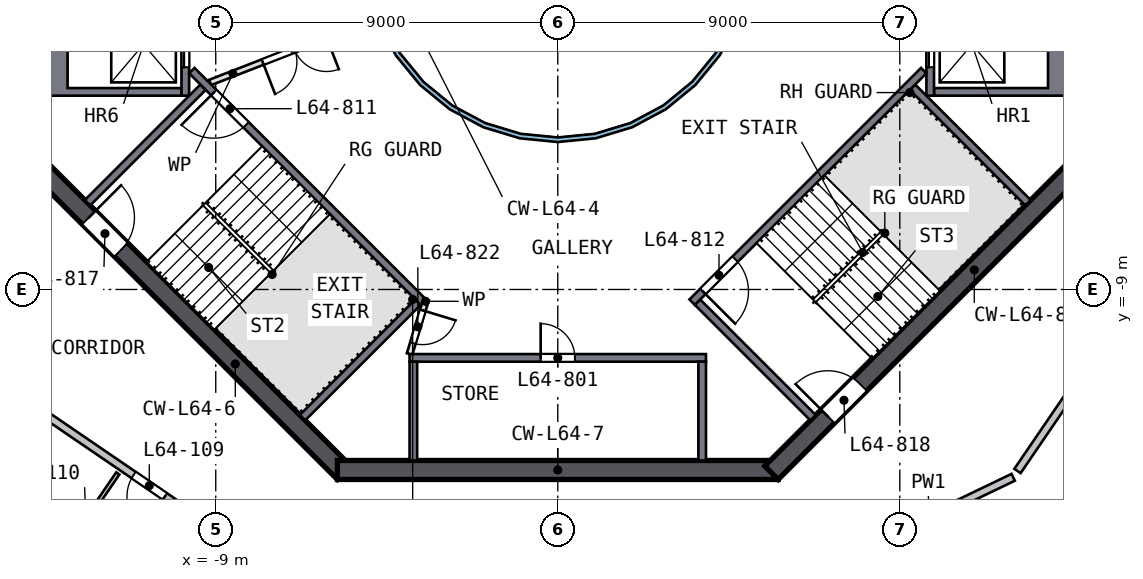
"""IFC4 building model, lengths in metres.
Left out: names, types, materials, properties, quantities, classifications, styles, units other than length and angle.
Written with IfcOpenShell. Run it as: python <this file> out.ifc"""

import sys

from ifc_helpers import new_model, si_unit, direction, frame, frame_2d, origin, place, context, subcontext, project, spatial, polyline, rectangle, outline, extrude, element, fill, save


model = new_model("IFC4")
c1 = context("Model", 3, precision=1e-05, world=origin(), true_north=direction((0.0, 1.0)))
c2 = subcontext(c1, "Body", "Model", "MODEL_VIEW")
j1 = project(units=[si_unit("LENGTHUNIT", "METRE"), si_unit("PLANEANGLEUNIT", "RADIAN")], contexts=[c1])
p1 = place(None, origin())
s1 = spatial("IfcSite", under=j1, at=p1, CompositionType="ELEMENT")
p2 = place(p1, origin())
s2 = spatial("IfcBuilding", under=s1, at=p2, CompositionType="ELEMENT")
p3 = place(p2, frame((0.0, 0.0, 259.5)))
s3 = spatial("IfcBuildingStorey", under=s2, at=p3, CompositionType="ELEMENT", Elevation=259.5)
p4 = place(p3, frame((-13.823, -5.622, 0.0), z_axis=(0.0, 0.0, 1.0), x_axis=(0.707106781, -0.707106781, 0.0)))
e1 = element("IfcWall", 1, at=p4, inside=s3, PredefinedType="SHEAR", context=c2, shape_type="SweptSolid", body=[
    extrude(rectangle(XDim=11.598, YDim=0.5, at=frame_2d((5.799, 0.0))), origin(), (0.0, 0.0, 1.0), 3.5),
])
p5 = place(p4, frame((2.099, 0.0, 0.0)))
e2 = element("IfcOpeningElement", 2, at=p5, cuts=e1, PredefinedType="OPENING", context=c2, shape_type="SweptSolid", body=[
    extrude(rectangle(XDim=1.2, YDim=2.1, at=frame_2d((0.6, 1.05))), frame((0.0, 0.26, 0.0), z_axis=(0.0, -1.0, 0.0), x_axis=(1.0, 0.0, 0.0)), (0.0, 0.0, 1.0), 0.52),
])
p6 = place(p3, frame((-5.799, -13.75, 0.0), z_axis=(0.0, 0.0, 1.0), x_axis=(1.0, 0.0, 0.0)))
e3 = element("IfcWall", 3, at=p6, inside=s3, PredefinedType="SHEAR", context=c2, shape_type="SweptSolid", body=[
    extrude(rectangle(XDim=11.598, YDim=0.5, at=frame_2d((5.799, 0.0))), origin(), (0.0, 0.0, 1.0), 3.5),
])
p7 = place(p3, frame((5.622, -13.823, 0.0), z_axis=(0.0, 0.0, 1.0), x_axis=(0.707106781, 0.707106781, 0.0)))
e4 = element("IfcWall", 4, at=p7, inside=s3, PredefinedType="SHEAR", context=c2, shape_type="SweptSolid", body=[
    extrude(rectangle(XDim=11.598, YDim=0.5, at=frame_2d((5.799, 0.0))), origin(), (0.0, 0.0, 1.0), 3.5),
])
p8 = place(p7, frame((2.099, 0.0, 0.0)))
e5 = element("IfcOpeningElement", 5, at=p8, cuts=e4, PredefinedType="OPENING", context=c2, shape_type="SweptSolid", body=[
    extrude(rectangle(XDim=1.2, YDim=2.1, at=frame_2d((0.6, 1.05))), frame((0.0, 0.26, 0.0), z_axis=(0.0, -1.0, 0.0), x_axis=(1.0, 0.0, 0.0)), (0.0, 0.0, 1.0), 0.52),
])
p9 = place(p3, origin())
e6 = element("IfcWall", 6, at=p9, inside=s3, PredefinedType="SOLIDWALL", context=c2, shape_type="SweptSolid", body=[
    extrude(outline(polyline([(13.5, -3.9), (9.9, -3.9), (9.9, -3.7), (12.9, -3.7), (12.9, -1.4), (9.9, -1.4), (9.9, -1.2), (13.5, -1.2), (13.5, -3.9)])), origin(), (0.0, 0.0, 1.0), 3.0),
])
p10 = place(p3, frame((9.8, -1.2, 0.0), z_axis=(0.0, 0.0, 1.0), x_axis=(0.0, -1.0, 0.0)))
e7 = element("IfcWall", 7, at=p10, inside=s3, PredefinedType="SOLIDWALL", context=c2, shape_type="SweptSolid", body=[
    extrude(rectangle(XDim=2.7, YDim=0.2, at=frame_2d((1.35, 0.0))), origin(), (0.0, 0.0, 1.0), 3.0),
])
p11 = place(p10, frame((0.75, 0.0, 0.0)))
e8 = element("IfcOpeningElement", 8, at=p11, cuts=e7, PredefinedType="OPENING", context=c2, shape_type="SweptSolid", body=[
    extrude(rectangle(XDim=1.2, YDim=2.1, at=frame_2d((0.6, 1.05))), frame((0.0, 0.11, 0.0), z_axis=(0.0, -1.0, 0.0), x_axis=(1.0, 0.0, 0.0)), (0.0, 0.0, 1.0), 0.22),
])
p12 = place(p3, origin())
e9 = element("IfcWall", 9, at=p12, inside=s3, PredefinedType="SOLIDWALL", context=c2, shape_type="SweptSolid", body=[
    extrude(outline(polyline([(-13.5, -3.9), (-13.5, -1.2), (-9.9, -1.2), (-9.9, -1.4), (-12.9, -1.4), (-12.9, -3.7), (-9.9, -3.7), (-9.9, -3.9), (-13.5, -3.9)])), origin(), (0.0, 0.0, 1.0), 3.0),
])
p13 = place(p3, frame((-9.8, -1.2, 0.0), z_axis=(0.0, 0.0, 1.0), x_axis=(0.0, -1.0, 0.0)))
e10 = element("IfcWall", 10, at=p13, inside=s3, PredefinedType="SOLIDWALL", context=c2, shape_type="SweptSolid", body=[
    extrude(rectangle(XDim=2.7, YDim=0.2, at=frame_2d((1.35, 0.0))), origin(), (0.0, 0.0, 1.0), 3.0),
])
p14 = place(p13, frame((0.75, 0.0, 0.0)))
e11 = element("IfcOpeningElement", 11, at=p14, cuts=e10, PredefinedType="OPENING", context=c2, shape_type="SweptSolid", body=[
    extrude(rectangle(XDim=1.2, YDim=2.1, at=frame_2d((0.6, 1.05))), frame((0.0, 0.11, 0.0), z_axis=(0.0, -1.0, 0.0), x_axis=(1.0, 0.0, 0.0)), (0.0, 0.0, 1.0), 0.22),
])
p15 = place(p3, frame((-3.9, -10.8, 0.0), z_axis=(0.0, 0.0, 1.0), x_axis=(1.0, 0.0, 0.0)))
e12 = element("IfcWall", 12, at=p15, inside=s3, PredefinedType="SOLIDWALL", context=c2, shape_type="SweptSolid", body=[
    extrude(rectangle(XDim=7.8, YDim=0.2, at=frame_2d((3.9, 0.0))), origin(), (0.0, 0.0, 1.0), 3.0),
])
p16 = place(p15, frame((3.45, 0.0, 0.0)))
e13 = element("IfcOpeningElement", 13, at=p16, cuts=e12, PredefinedType="OPENING", context=c2, shape_type="SweptSolid", body=[
    extrude(rectangle(XDim=0.9, YDim=2.1, at=frame_2d((0.45, 1.05))), frame((0.0, 0.11, 0.0), z_axis=(0.0, -1.0, 0.0), x_axis=(1.0, 0.0, 0.0)), (0.0, 0.0, 1.0), 0.22),
])
for number, where, z_axis, x_axis in (
    (14, (-3.8, -10.9, 0.0), (0.0, 0.0, 1.0), (0.0, -1.0, 0.0)),
    (15, (3.8, -10.9, 0.0), (0.0, 0.0, 1.0), (0.0, -1.0, 0.0)),
):
    element("IfcWall", number, at=place(p3, frame(where, z_axis=z_axis, x_axis=x_axis)), inside=s3, PredefinedType="SOLIDWALL", context=c2, shape_type="SweptSolid", body=[
        extrude(rectangle(XDim=2.6, YDim=0.2, at=frame_2d((1.3, 0.0))), origin(), (0.0, 0.0, 1.0), 3.0),
    ])
p17 = place(p3, frame((-3.535, -9.334, 0.0), z_axis=(0.0, 0.0, 1.0), x_axis=(-0.707120946, 0.707092617, 0.0)))
e16 = element("IfcWall", 16, at=p17, inside=s3, PredefinedType="SOLIDWALL", context=c2, shape_type="SweptSolid", body=[
    extrude(rectangle(XDim=8.618, YDim=0.2, at=frame_2d((4.309, 0.0))), origin(), (0.0, 0.0, 1.0), 3.0),
])
p18 = place(p17, frame((6.6, 0.0, 0.0)))
e17 = element("IfcOpeningElement", 17, at=p18, cuts=e16, PredefinedType="OPENING", context=c2, shape_type="SweptSolid", body=[
    extrude(rectangle(XDim=1.2, YDim=2.1, at=frame_2d((0.6, 1.05))), frame((0.0, 0.11, 0.0), z_axis=(0.0, -1.0, 0.0), x_axis=(1.0, 0.0, 0.0)), (0.0, 0.0, 1.0), 0.22),
])
for number, where, z_axis, x_axis in (
    (18, (-9.334, -3.677, 0.0), (0.0, 0.0, 1.0), (-0.707, -0.707, 0.0)),
    (19, (-3.677, -9.334, 0.0), (0.0, 0.0, 1.0), (-0.707, -0.707, 0.0)),
):
    element("IfcWall", number, at=place(p3, frame(where, z_axis=z_axis, x_axis=x_axis)), inside=s3, PredefinedType="SOLIDWALL", context=c2, shape_type="SweptSolid", body=[
        extrude(rectangle(XDim=4.3, YDim=0.2, at=frame_2d((2.15, 0.0))), origin(), (0.0, 0.0, 1.0), 3.0),
    ])
p19 = place(p3, frame((9.629, -3.24, 0.0), z_axis=(0.0, 0.0, 1.0), x_axis=(-0.707120946, -0.707092617, 0.0)))
e20 = element("IfcWall", 20, at=p19, inside=s3, PredefinedType="SOLIDWALL", context=c2, shape_type="SweptSolid", body=[
    extrude(rectangle(XDim=8.618, YDim=0.2, at=frame_2d((4.309, 0.0))), origin(), (0.0, 0.0, 1.0), 3.0),
])
p20 = place(p19, frame((7.018, 0.0, 0.0)))
e21 = element("IfcOpeningElement", 21, at=p20, cuts=e20, PredefinedType="OPENING", context=c2, shape_type="SweptSolid", body=[
    extrude(rectangle(XDim=1.2, YDim=2.1, at=frame_2d((0.6, 1.05))), frame((0.0, 0.11, 0.0), z_axis=(0.0, -1.0, 0.0), x_axis=(1.0, 0.0, 0.0)), (0.0, 0.0, 1.0), 0.22),
])
for number, where, z_axis, x_axis in (
    (22, (3.677, -9.334, 0.0), (0.0, 0.0, 1.0), (0.707, -0.707, 0.0)),
    (23, (9.334, -3.677, 0.0), (0.0, 0.0, 1.0), (0.707, -0.707, 0.0)),
):
    element("IfcWall", number, at=place(p3, frame(where, z_axis=z_axis, x_axis=x_axis)), inside=s3, PredefinedType="SOLIDWALL", context=c2, shape_type="SweptSolid", body=[
        extrude(rectangle(XDim=4.3, YDim=0.2, at=frame_2d((2.15, 0.0))), origin(), (0.0, 0.0, 1.0), 3.0),
    ])
p21 = place(p3, frame((-3.465, -9.263, 0.0), z_axis=(0.0, 0.0, 1.0), x_axis=(-0.289808785, -0.957084567, 0.0)))
e24 = element("IfcWall", 24, at=p21, inside=s3, PredefinedType="PARTITIONING", context=c2, shape_type="SweptSolid", body=[
    extrude(rectangle(XDim=1.501, YDim=0.15, at=frame_2d((0.75, 0.0))), origin(), (0.0, 0.0, 1.0), 3.0),
])
p22 = place(p21, frame((0.301, 0.0, 0.0)))
e25 = element("IfcOpeningElement", 25, at=p22, cuts=e24, PredefinedType="OPENING", context=c2, shape_type="SweptSolid", body=[
    extrude(rectangle(XDim=0.9, YDim=2.1, at=frame_2d((0.45, 1.05))), frame((0.0, 0.085, 0.0), z_axis=(0.0, -1.0, 0.0), x_axis=(1.0, 0.0, 0.0)), (0.0, 0.0, 1.0), 0.17),
])
p23 = place(p3, frame((-4.782, -1.857, 0.0), z_axis=(0.0, 0.0, 1.0), x_axis=(-0.932155279, -0.362058746, 0.0)))
e26 = element("IfcWall", 26, at=p23, inside=s3, PredefinedType="PARTITIONING", context=c2, shape_type="SweptSolid", body=[
    extrude(rectangle(XDim=4.682, YDim=0.15, at=frame_2d((2.341, 0.0))), origin(), (0.0, 0.0, 1.0), 3.0),
])
p24 = place(p23, frame((1.4, 0.0, 0.0)))
e27 = element("IfcOpeningElement", 27, at=p24, cuts=e26, PredefinedType="OPENING", context=c2, shape_type="SweptSolid", body=[
    extrude(rectangle(XDim=1.8, YDim=2.1, at=frame_2d((0.9, 1.05))), frame((0.0, 0.085, 0.0), z_axis=(0.0, -1.0, 0.0), x_axis=(1.0, 0.0, 0.0)), (0.0, 0.0, 1.0), 0.17),
])
p25 = place(p3, origin())
e28 = element("IfcWall", 28, at=p25, inside=s3, PredefinedType="SOLIDWALL", context=c2, shape_type="SweptSolid", body=[
    extrude(outline(polyline([(5.021, -0.999), (4.73, -1.959), (4.257, -2.844), (3.62, -3.62), (2.844, -4.257), (1.959, -4.73), (0.999, -5.021), (0.0, -5.12), (-0.999, -5.021), (-1.959, -4.73), (-2.844, -4.257), (-3.62, -3.62), (-4.257, -2.844), (-4.73, -1.959), (-5.021, -0.999), (-5.12, 0.0), (-5.021, 0.999), (-4.73, 1.959), (-4.257, 2.844), (-3.62, 3.62), (-2.844, 4.257), (-1.959, 4.73), (-0.999, 5.021), (0.0, 5.12), (0.999, 5.021), (1.959, 4.73), (2.844, 4.257), (3.62, 3.62), (4.257, 2.844), (4.73, 1.959), (5.021, 0.999), (5.12, 0.0), (5.021, -0.999)]), holes=[polyline([(4.904, 0.976), (4.619, 1.913), (4.157, 2.778), (3.535, 3.535), (2.778, 4.157), (1.913, 4.619), (0.976, 4.904), (0.0, 5.0), (-0.976, 4.904), (-1.913, 4.619), (-2.778, 4.157), (-3.535, 3.535), (-4.157, 2.778), (-4.619, 1.913), (-4.904, 0.976), (-5.0, 0.0), (-4.904, -0.976), (-4.619, -1.913), (-4.157, -2.778), (-3.535, -3.535), (-2.778, -4.157), (-1.913, -4.619), (-0.976, -4.904), (0.0, -5.0), (0.976, -4.904), (1.913, -4.619), (2.778, -4.157), (3.535, -3.535), (4.157, -2.778), (4.619, -1.913), (4.904, -0.976), (5.0, 0.0), (4.904, 0.976)])]), origin(), (0.0, 0.0, 1.0), 3.0),
])
p26 = place(p3, frame((-6.083, -17.349, 0.0), z_axis=(0.0, 0.0, 1.0), x_axis=(-0.825908424, 0.563804288, 0.0)))
e29 = element("IfcWall", 29, at=p26, inside=s3, PredefinedType="SOLIDWALL", context=c2, shape_type="SweptSolid", body=[
    extrude(rectangle(XDim=9.316, YDim=0.2, at=frame_2d((4.658, 0.0))), origin(), (0.0, 0.0, 1.0), 3.0),
])
p27 = place(p26, frame((5.15, 0.0, 0.0)))
e30 = element("IfcOpeningElement", 30, at=p27, cuts=e29, PredefinedType="OPENING", context=c2, shape_type="SweptSolid", body=[
    extrude(rectangle(XDim=1.0, YDim=2.1, at=frame_2d((0.5, 1.05))), frame((0.0, 0.11, 0.0), z_axis=(0.0, -1.0, 0.0), x_axis=(1.0, 0.0, 0.0)), (0.0, 0.0, 1.0), 0.22),
])
p28 = place(p3, frame((11.983, -13.942, 0.0), z_axis=(0.0, 0.0, 1.0), x_axis=(-0.901228413, -0.433344375, 0.0)))
e31 = element("IfcWall", 31, at=p28, inside=s3, PredefinedType="SOLIDWALL", context=c2, shape_type="SweptSolid", body=[
    extrude(rectangle(XDim=9.316, YDim=0.2, at=frame_2d((4.658, 0.0))), origin(), (0.0, 0.0, 1.0), 3.0),
])
p29 = place(p28, frame((5.15, 0.0, 0.0)))
e32 = element("IfcOpeningElement", 32, at=p29, cuts=e31, PredefinedType="OPENING", context=c2, shape_type="SweptSolid", body=[
    extrude(rectangle(XDim=1.0, YDim=2.1, at=frame_2d((0.5, 1.05))), frame((0.0, 0.11, 0.0), z_axis=(0.0, -1.0, 0.0), x_axis=(1.0, 0.0, 0.0)), (0.0, 0.0, 1.0), 0.22),
])
p30 = place(p3, frame((17.236, -6.248, 0.0), z_axis=(0.0, 0.0, 1.0), x_axis=(-0.563807947, -0.825905926, 0.0)))
e33 = element("IfcWall", 33, at=p30, inside=s3, PredefinedType="SOLIDWALL", context=c2, shape_type="SweptSolid", body=[
    extrude(rectangle(XDim=9.115, YDim=0.2, at=frame_2d((4.558, 0.0))), origin(), (0.0, 0.0, 1.0), 3.0),
])
p31 = place(p30, frame((0.2, 0.0, 0.0)))
e34 = element("IfcOpeningElement", 34, at=p31, cuts=e33, PredefinedType="OPENING", context=c2, shape_type="SweptSolid", body=[
    extrude(rectangle(XDim=1.0, YDim=2.1, at=frame_2d((0.5, 1.05))), frame((0.0, 0.11, 0.0), z_axis=(0.0, -1.0, 0.0), x_axis=(1.0, 0.0, 0.0)), (0.0, 0.0, 1.0), 0.22),
])
p32 = place(p3, frame((-13.325, -16.401, 0.0), z_axis=(0.0, 0.0, 1.0), x_axis=(0.563808375, 0.825905634, 0.0)))
e35 = element("IfcWall", 35, at=p32, inside=s3, PredefinedType="PARTITIONING", context=c2, shape_type="SweptSolid", body=[
    extrude(rectangle(XDim=3.1, YDim=0.1, at=frame_2d((1.55, 0.0))), origin(), (0.0, 0.0, 1.0), 3.0),
])
p33 = place(p32, frame((1.15, 0.0, 0.0)))
e36 = element("IfcOpeningElement", 36, at=p33, cuts=e35, PredefinedType="OPENING", context=c2, shape_type="SweptSolid", body=[
    extrude(rectangle(XDim=0.9, YDim=2.1, at=frame_2d((0.45, 1.05))), frame((0.0, 0.06, 0.0), z_axis=(0.0, -1.0, 0.0), x_axis=(1.0, 0.0, 0.0)), (0.0, 0.0, 1.0), 0.12),
])
p34 = place(p16, origin())
e37 = element("IfcDoor", 37, at=p34, inside=s3, OperationType="SINGLE_SWING_LEFT", PredefinedType="DOOR", context=c2, shape_type="SweptSolid", body=[
    extrude(rectangle(XDim=0.9, YDim=2.1, at=frame_2d((0.45, 1.05))), frame((0.0, 0.025, 0.0), z_axis=(0.0, -1.0, 0.0), x_axis=(1.0, 0.0, 0.0)), (0.0, 0.0, 1.0), 0.05),
])
fill(e13, e37)
p35 = place(p11, origin())
e38 = element("IfcDoor", 38, at=p35, inside=s3, OperationType="DOUBLE_DOOR_SLIDING", PredefinedType="DOOR", context=c2, shape_type="SweptSolid", body=[
    extrude(rectangle(XDim=1.2, YDim=2.1, at=frame_2d((0.6, 1.05))), frame((0.0, 0.025, 0.0), z_axis=(0.0, -1.0, 0.0), x_axis=(1.0, 0.0, 0.0)), (0.0, 0.0, 1.0), 0.05),
])
fill(e8, e38)
p36 = place(p14, origin())
e39 = element("IfcDoor", 39, at=p36, inside=s3, OperationType="DOUBLE_DOOR_SLIDING", PredefinedType="DOOR", context=c2, shape_type="SweptSolid", body=[
    extrude(rectangle(XDim=1.2, YDim=2.1, at=frame_2d((0.6, 1.05))), frame((0.0, 0.025, 0.0), z_axis=(0.0, -1.0, 0.0), x_axis=(1.0, 0.0, 0.0)), (0.0, 0.0, 1.0), 0.05),
])
fill(e11, e39)
p37 = place(p18, origin())
e40 = element("IfcDoor", 40, at=p37, inside=s3, OperationType="SINGLE_SWING_RIGHT", PredefinedType="DOOR", context=c2, shape_type="SweptSolid", body=[
    extrude(rectangle(XDim=1.2, YDim=2.1, at=frame_2d((0.6, 1.05))), frame((0.0, 0.025, 0.0), z_axis=(0.0, -1.0, 0.0), x_axis=(1.0, 0.0, 0.0)), (0.0, 0.0, 1.0), 0.05),
])
fill(e17, e40)
p38 = place(p20, origin())
e41 = element("IfcDoor", 41, at=p38, inside=s3, OperationType="SINGLE_SWING_RIGHT", PredefinedType="DOOR", context=c2, shape_type="SweptSolid", body=[
    extrude(rectangle(XDim=1.2, YDim=2.1, at=frame_2d((0.6, 1.05))), frame((0.0, 0.025, 0.0), z_axis=(0.0, -1.0, 0.0), x_axis=(1.0, 0.0, 0.0)), (0.0, 0.0, 1.0), 0.05),
])
fill(e21, e41)
p39 = place(p5, origin())
e42 = element("IfcDoor", 42, at=p39, inside=s3, OperationType="SINGLE_SWING_LEFT", PredefinedType="DOOR", context=c2, shape_type="SweptSolid", body=[
    extrude(rectangle(XDim=1.2, YDim=2.1, at=frame_2d((0.6, 1.05))), frame((0.0, 0.025, 0.0), z_axis=(0.0, -1.0, 0.0), x_axis=(1.0, 0.0, 0.0)), (0.0, 0.0, 1.0), 0.05),
])
fill(e2, e42)
p40 = place(p8, origin())
e43 = element("IfcDoor", 43, at=p40, inside=s3, OperationType="SINGLE_SWING_LEFT", PredefinedType="DOOR", context=c2, shape_type="SweptSolid", body=[
    extrude(rectangle(XDim=1.2, YDim=2.1, at=frame_2d((0.6, 1.05))), frame((0.0, 0.025, 0.0), z_axis=(0.0, -1.0, 0.0), x_axis=(1.0, 0.0, 0.0)), (0.0, 0.0, 1.0), 0.05),
])
fill(e5, e43)
p41 = place(p22, origin())
e44 = element("IfcDoor", 44, at=p41, inside=s3, OperationType="SINGLE_SWING_LEFT", PredefinedType="DOOR", context=c2, shape_type="SweptSolid", body=[
    extrude(rectangle(XDim=0.9, YDim=2.1, at=frame_2d((0.45, 1.05))), frame((0.0, 0.025, 0.0), z_axis=(0.0, -1.0, 0.0), x_axis=(1.0, 0.0, 0.0)), (0.0, 0.0, 1.0), 0.05),
])
fill(e25, e44)
p42 = place(p24, origin())
e45 = element("IfcDoor", 45, at=p42, inside=s3, OperationType="DOUBLE_DOOR_SINGLE_SWING", PredefinedType="DOOR", context=c2, shape_type="SweptSolid", body=[
    extrude(rectangle(XDim=1.8, YDim=2.1, at=frame_2d((0.9, 1.05))), frame((0.0, 0.025, 0.0), z_axis=(0.0, -1.0, 0.0), x_axis=(1.0, 0.0, 0.0)), (0.0, 0.0, 1.0), 0.05),
])
fill(e27, e45)
p43 = place(p27, origin())
e46 = element("IfcDoor", 46, at=p43, inside=s3, OperationType="SINGLE_SWING_LEFT", PredefinedType="DOOR", context=c2, shape_type="SweptSolid", body=[
    extrude(rectangle(XDim=1.0, YDim=2.1, at=frame_2d((0.5, 1.05))), frame((0.0, 0.025, 0.0), z_axis=(0.0, -1.0, 0.0), x_axis=(1.0, 0.0, 0.0)), (0.0, 0.0, 1.0), 0.05),
])
fill(e30, e46)
save(model, sys.argv[1])
